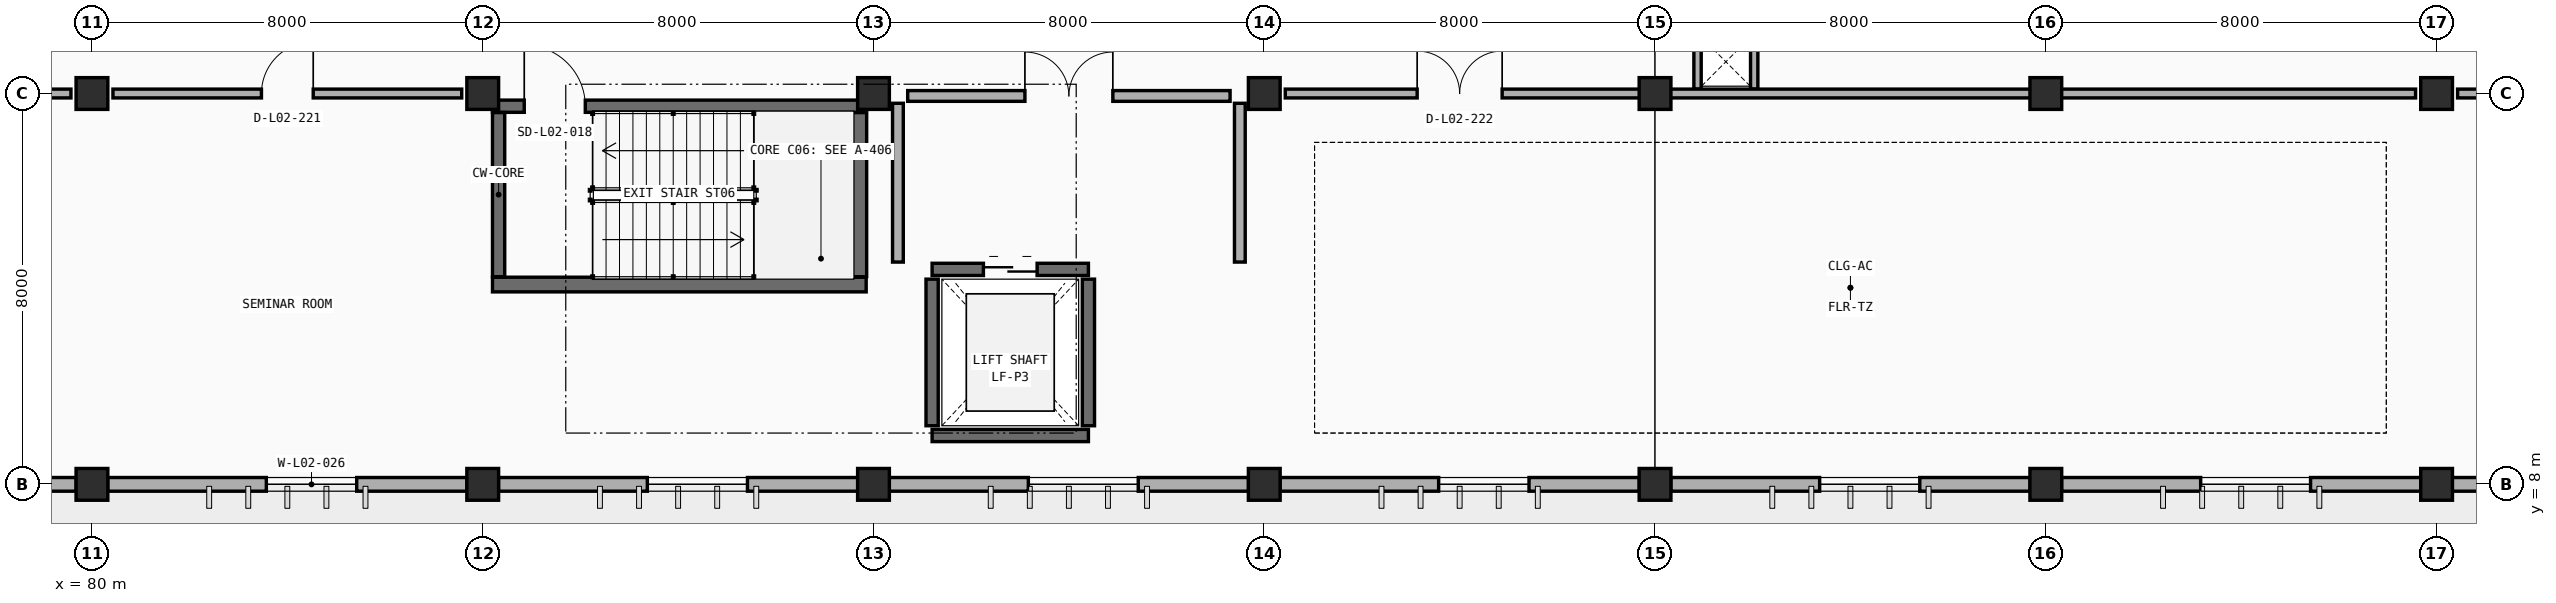
"""IFC4 building model, lengths in metres.
Left out: names, types, materials, properties, quantities, classifications, styles, units other than length and angle.
Written with IfcOpenShell. Run it as: python <this file> out.ifc"""

import sys

from ifc_helpers import new_model, si_unit, direction, frame, frame_2d, origin, origin_2d, place, context, subcontext, project, spatial, rectangle, extrude, element, fill, save


model = new_model("IFC4")
c1 = context("Model", 3, precision=1e-05, world=origin(), true_north=direction((0.0, 1.0)))
c2 = subcontext(c1, "Body", "Model", "MODEL_VIEW")
j1 = project(units=[si_unit("LENGTHUNIT", "METRE"), si_unit("PLANEANGLEUNIT", "RADIAN")], contexts=[c1])
p1 = place(None, origin())
s1 = spatial("IfcSite", under=j1, at=p1, CompositionType="ELEMENT")
p2 = place(p1, origin())
s2 = spatial("IfcBuilding", under=s1, at=p2, CompositionType="ELEMENT")
p3 = place(p2, frame((0.0, 0.0, 4.8)))
s3 = spatial("IfcBuildingStorey", under=s2, at=p3, CompositionType="ELEMENT", Elevation=4.8)
for number, where, z_axis, x_axis in (
    (1, (80.0, 8.0, 0.0), (0.0, 0.0, 1.0), (1.0, 0.0, 0.0)),
    (2, (88.0, 8.0, 0.0), (0.0, 0.0, 1.0), (1.0, 0.0, 0.0)),
    (3, (96.0, 8.0, 0.0), (0.0, 0.0, 1.0), (1.0, 0.0, 0.0)),
    (4, (104.0, 8.0, 0.0), (0.0, 0.0, 1.0), (1.0, 0.0, 0.0)),
    (5, (112.0, 8.0, 0.0), (0.0, 0.0, 1.0), (1.0, 0.0, 0.0)),
    (6, (120.0, 8.0, 0.0), (0.0, 0.0, 1.0), (1.0, 0.0, 0.0)),
    (7, (128.0, 8.0, 0.0), (0.0, 0.0, 1.0), (1.0, 0.0, 0.0)),
    (8, (80.0, 16.0, 0.0), (0.0, 0.0, 1.0), (1.0, 0.0, 0.0)),
    (9, (88.0, 16.0, 0.0), (0.0, 0.0, 1.0), (1.0, 0.0, 0.0)),
    (10, (96.0, 16.0, 0.0), (0.0, 0.0, 1.0), (1.0, 0.0, 0.0)),
    (11, (104.0, 16.0, 0.0), (0.0, 0.0, 1.0), (1.0, 0.0, 0.0)),
    (12, (112.0, 16.0, 0.0), (0.0, 0.0, 1.0), (1.0, 0.0, 0.0)),
    (13, (120.0, 16.0, 0.0), (0.0, 0.0, 1.0), (1.0, 0.0, 0.0)),
    (14, (128.0, 16.0, 0.0), (0.0, 0.0, 1.0), (1.0, 0.0, 0.0)),
):
    element("IfcColumn", number, at=place(p3, frame(where, z_axis=z_axis, x_axis=x_axis)), inside=s3, PredefinedType="COLUMN", context=c2, shape_type="SweptSolid", body=[
        extrude(rectangle(XDim=0.65, YDim=0.65, at=origin_2d()), origin(), (0.0, 0.0, 1.0), 4.8),
    ])
p4 = place(p3, frame((79.678, 8.0, 0.0), z_axis=(0.0, 0.0, 1.0), x_axis=(-1.0, 0.0, 0.0)))
e15 = element("IfcWall", 15, at=p4, inside=s3, PredefinedType="STANDARD", context=c2, shape_type="SweptSolid", body=[
    extrude(rectangle(XDim=7.356, YDim=0.28, at=frame_2d((3.678, 0.0))), origin(), (0.0, 0.0, 1.0), 3.91),
])
p5 = place(p4, frame((2.858, 0.0, 0.0)))
e16 = element("IfcOpeningElement", 16, at=p5, cuts=e15, PredefinedType="OPENING", context=c2, shape_type="SweptSolid", body=[
    extrude(rectangle(XDim=1.45, YDim=2.25, at=frame_2d((0.725, 1.125))), frame((0.0, 0.15, 0.0), z_axis=(0.0, -1.0, 0.0), x_axis=(1.0, 0.0, 0.0)), (0.0, 0.0, 1.0), 0.3),
])
p6 = place(p3, frame((87.678, 8.0, 0.0), z_axis=(0.0, 0.0, 1.0), x_axis=(-1.0, 0.0, 0.0)))
e17 = element("IfcWall", 17, at=p6, inside=s3, PredefinedType="STANDARD", context=c2, shape_type="SweptSolid", body=[
    extrude(rectangle(XDim=7.356, YDim=0.28, at=frame_2d((3.678, 0.0))), origin(), (0.0, 0.0, 1.0), 3.91),
])
p7 = place(p6, frame((2.258, 0.0, 0.9)))
e18 = element("IfcOpeningElement", 18, at=p7, cuts=e17, PredefinedType="OPENING", context=c2, shape_type="SweptSolid", body=[
    extrude(rectangle(XDim=1.85, YDim=1.25, at=frame_2d((0.925, 0.625))), frame((0.0, 0.15, 0.0), z_axis=(0.0, -1.0, 0.0), x_axis=(1.0, 0.0, 0.0)), (0.0, 0.0, 1.0), 0.3),
])
p8 = place(p3, frame((95.678, 8.0, 0.0), z_axis=(0.0, 0.0, 1.0), x_axis=(-1.0, 0.0, 0.0)))
e19 = element("IfcWall", 19, at=p8, inside=s3, PredefinedType="STANDARD", context=c2, shape_type="SweptSolid", body=[
    extrude(rectangle(XDim=7.356, YDim=0.28, at=frame_2d((3.678, 0.0))), origin(), (0.0, 0.0, 1.0), 3.91),
])
p9 = place(p8, frame((2.258, 0.0, 0.9)))
e20 = element("IfcOpeningElement", 20, at=p9, cuts=e19, PredefinedType="OPENING", context=c2, shape_type="SweptSolid", body=[
    extrude(rectangle(XDim=2.05, YDim=1.25, at=frame_2d((1.025, 0.625))), frame((0.0, 0.15, 0.0), z_axis=(0.0, -1.0, 0.0), x_axis=(1.0, 0.0, 0.0)), (0.0, 0.0, 1.0), 0.3),
])
p10 = place(p3, frame((103.678, 8.0, 0.0), z_axis=(0.0, 0.0, 1.0), x_axis=(-1.0, 0.0, 0.0)))
e21 = element("IfcWall", 21, at=p10, inside=s3, PredefinedType="STANDARD", context=c2, shape_type="SweptSolid", body=[
    extrude(rectangle(XDim=7.356, YDim=0.28, at=frame_2d((3.678, 0.0))), origin(), (0.0, 0.0, 1.0), 3.91),
])
p11 = place(p10, frame((2.258, 0.0, 0.9)))
e22 = element("IfcOpeningElement", 22, at=p11, cuts=e21, PredefinedType="OPENING", context=c2, shape_type="SweptSolid", body=[
    extrude(rectangle(XDim=2.25, YDim=1.25, at=frame_2d((1.125, 0.625))), frame((0.0, 0.15, 0.0), z_axis=(0.0, -1.0, 0.0), x_axis=(1.0, 0.0, 0.0)), (0.0, 0.0, 1.0), 0.3),
])
p12 = place(p3, frame((111.678, 8.0, 0.0), z_axis=(0.0, 0.0, 1.0), x_axis=(-1.0, 0.0, 0.0)))
e23 = element("IfcWall", 23, at=p12, inside=s3, PredefinedType="STANDARD", context=c2, shape_type="SweptSolid", body=[
    extrude(rectangle(XDim=7.356, YDim=0.28, at=frame_2d((3.678, 0.0))), origin(), (0.0, 0.0, 1.0), 3.91),
])
p13 = place(p12, frame((2.258, 0.0, 0.9)))
e24 = element("IfcOpeningElement", 24, at=p13, cuts=e23, PredefinedType="OPENING", context=c2, shape_type="SweptSolid", body=[
    extrude(rectangle(XDim=1.85, YDim=1.25, at=frame_2d((0.925, 0.625))), frame((0.0, 0.15, 0.0), z_axis=(0.0, -1.0, 0.0), x_axis=(1.0, 0.0, 0.0)), (0.0, 0.0, 1.0), 0.3),
])
p14 = place(p3, frame((119.678, 8.0, 0.0), z_axis=(0.0, 0.0, 1.0), x_axis=(-1.0, 0.0, 0.0)))
e25 = element("IfcWall", 25, at=p14, inside=s3, PredefinedType="STANDARD", context=c2, shape_type="SweptSolid", body=[
    extrude(rectangle(XDim=7.356, YDim=0.28, at=frame_2d((3.678, 0.0))), origin(), (0.0, 0.0, 1.0), 3.91),
])
p15 = place(p14, frame((2.258, 0.0, 0.9)))
e26 = element("IfcOpeningElement", 26, at=p15, cuts=e25, PredefinedType="OPENING", context=c2, shape_type="SweptSolid", body=[
    extrude(rectangle(XDim=2.05, YDim=1.25, at=frame_2d((1.025, 0.625))), frame((0.0, 0.15, 0.0), z_axis=(0.0, -1.0, 0.0), x_axis=(1.0, 0.0, 0.0)), (0.0, 0.0, 1.0), 0.3),
])
p16 = place(p3, frame((127.678, 8.0, 0.0), z_axis=(0.0, 0.0, 1.0), x_axis=(-1.0, 0.0, 0.0)))
e27 = element("IfcWall", 27, at=p16, inside=s3, PredefinedType="STANDARD", context=c2, shape_type="SweptSolid", body=[
    extrude(rectangle(XDim=7.356, YDim=0.28, at=frame_2d((3.678, 0.0))), origin(), (0.0, 0.0, 1.0), 3.91),
])
p17 = place(p16, frame((2.258, 0.0, 0.9)))
e28 = element("IfcOpeningElement", 28, at=p17, cuts=e27, PredefinedType="OPENING", context=c2, shape_type="SweptSolid", body=[
    extrude(rectangle(XDim=2.25, YDim=1.25, at=frame_2d((1.125, 0.625))), frame((0.0, 0.15, 0.0), z_axis=(0.0, -1.0, 0.0), x_axis=(1.0, 0.0, 0.0)), (0.0, 0.0, 1.0), 0.3),
])
p18 = place(p3, frame((135.678, 8.0, 0.0), z_axis=(0.0, 0.0, 1.0), x_axis=(-1.0, 0.0, 0.0)))
e29 = element("IfcWall", 29, at=p18, inside=s3, PredefinedType="STANDARD", context=c2, shape_type="SweptSolid", body=[
    extrude(rectangle(XDim=7.356, YDim=0.28, at=frame_2d((3.678, 0.0))), origin(), (0.0, 0.0, 1.0), 3.91),
])
p19 = place(p18, frame((2.258, 0.0, 0.9)))
e30 = element("IfcOpeningElement", 30, at=p19, cuts=e29, PredefinedType="OPENING", context=c2, shape_type="SweptSolid", body=[
    extrude(rectangle(XDim=1.85, YDim=1.25, at=frame_2d((0.925, 0.625))), frame((0.0, 0.15, 0.0), z_axis=(0.0, -1.0, 0.0), x_axis=(1.0, 0.0, 0.0)), (0.0, 0.0, 1.0), 0.3),
])
p20 = place(p3, frame((88.2, 12.09, 0.0), z_axis=(0.0, 0.0, 1.0), x_axis=(1.0, 0.0, 0.0)))
e31 = element("IfcWall", 31, at=p20, inside=s3, PredefinedType="SHEAR", context=c2, shape_type="SweptSolid", body=[
    extrude(rectangle(XDim=7.65, YDim=0.3, at=frame_2d((3.825, 0.0))), origin(), (0.0, 0.0, 1.0), 4.8),
])
p21 = place(p3, frame((95.71, 12.25, 0.0), z_axis=(0.0, 0.0, 1.0), x_axis=(0.0, 1.0, 0.0)))
e32 = element("IfcWall", 32, at=p21, inside=s3, PredefinedType="SHEAR", context=c2, shape_type="SweptSolid", body=[
    extrude(rectangle(XDim=3.36, YDim=0.3, at=frame_2d((1.68, 0.0))), origin(), (0.0, 0.0, 1.0), 4.8),
])
p22 = place(p3, frame((88.2, 15.74, 0.0), z_axis=(0.0, 0.0, 1.0), x_axis=(1.0, 0.0, 0.0)))
e33 = element("IfcWall", 33, at=p22, inside=s3, PredefinedType="SOLIDWALL", context=c2, shape_type="SweptSolid", body=[
    extrude(rectangle(XDim=7.65, YDim=0.25, at=frame_2d((3.825, 0.0))), origin(), (0.0, 0.0, 1.0), 4.8),
])
p23 = place(p22, frame((0.65, 0.0, 0.0)))
e34 = element("IfcOpeningElement", 34, at=p23, cuts=e33, PredefinedType="OPENING", context=c2, shape_type="SweptSolid", body=[
    extrude(rectangle(XDim=1.25, YDim=2.15, at=frame_2d((0.625, 1.075))), frame((0.0, 0.135, 0.0), z_axis=(0.0, -1.0, 0.0), x_axis=(1.0, 0.0, 0.0)), (0.0, 0.0, 1.0), 0.27),
])
p24 = place(p3, frame((88.325, 12.25, 0.0), z_axis=(0.0, 0.0, 1.0), x_axis=(0.0, 1.0, 0.0)))
e35 = element("IfcWall", 35, at=p24, inside=s3, PredefinedType="SOLIDWALL", context=c2, shape_type="SweptSolid", body=[
    extrude(rectangle(XDim=3.36, YDim=0.25, at=frame_2d((1.68, 0.0))), origin(), (0.0, 0.0, 1.0), 4.8),
])
p25 = place(p3, frame((97.2, 9.0, 0.0), z_axis=(0.0, 0.0, 1.0), x_axis=(1.0, 0.0, 0.0)))
e36 = element("IfcWall", 36, at=p25, inside=s3, PredefinedType="SOLIDWALL", context=c2, shape_type="SweptSolid", body=[
    extrude(rectangle(XDim=3.2, YDim=0.25, at=frame_2d((1.6, 0.0))), origin(), (0.0, 0.0, 1.0), 4.8),
])
p26 = place(p3, frame((97.2, 12.4, 0.0), z_axis=(0.0, 0.0, 1.0), x_axis=(1.0, 0.0, 0.0)))
e37 = element("IfcWall", 37, at=p26, inside=s3, PredefinedType="SOLIDWALL", context=c2, shape_type="SweptSolid", body=[
    extrude(rectangle(XDim=3.2, YDim=0.25, at=frame_2d((1.6, 0.0))), origin(), (0.0, 0.0, 1.0), 4.8),
])
p27 = place(p26, frame((1.05, 0.0, 0.0)))
e38 = element("IfcOpeningElement", 38, at=p27, cuts=e37, PredefinedType="OPENING", context=c2, shape_type="SweptSolid", body=[
    extrude(rectangle(XDim=1.1, YDim=2.15, at=frame_2d((0.55, 1.075))), frame((0.0, 0.135, 0.0), z_axis=(0.0, -1.0, 0.0), x_axis=(1.0, 0.0, 0.0)), (0.0, 0.0, 1.0), 0.27),
])
for number, where, z_axis, x_axis in (
    (39, (97.2, 9.2, 0.0), (0.0, 0.0, 1.0), (0.0, 1.0, 0.0)),
    (40, (100.4, 9.2, 0.0), (0.0, 0.0, 1.0), (0.0, 1.0, 0.0)),
):
    element("IfcWall", number, at=place(p3, frame(where, z_axis=z_axis, x_axis=x_axis)), inside=s3, PredefinedType="SOLIDWALL", context=c2, shape_type="SweptSolid", body=[
        extrude(rectangle(XDim=3.0, YDim=0.25, at=frame_2d((1.5, 0.0))), origin(), (0.0, 0.0, 1.0), 4.8),
    ])
p28 = place(p3, frame((96.7, 15.95, 0.0), z_axis=(0.0, 0.0, 1.0), x_axis=(1.0, 0.0, 0.0)))
e41 = element("IfcWall", 41, at=p28, inside=s3, PredefinedType="PARTITIONING", context=c2, shape_type="SweptSolid", body=[
    extrude(rectangle(XDim=6.6, YDim=0.22, at=frame_2d((3.3, 0.0))), origin(), (0.0, 0.0, 1.0), 3.86),
])
p29 = place(p28, frame((2.4, 0.0, 0.0)))
e42 = element("IfcOpeningElement", 42, at=p29, cuts=e41, PredefinedType="OPENING", context=c2, shape_type="SweptSolid", body=[
    extrude(rectangle(XDim=1.8, YDim=2.2, at=frame_2d((0.9, 1.1))), frame((0.0, 0.12, 0.0), z_axis=(0.0, -1.0, 0.0), x_axis=(1.0, 0.0, 0.0)), (0.0, 0.0, 1.0), 0.24),
])
for number, where, z_axis, x_axis in (
    (43, (96.5, 12.55, 0.0), (0.0, 0.0, 1.0), (0.0, 1.0, 0.0)),
    (44, (103.5, 12.55, 0.0), (0.0, 0.0, 1.0), (0.0, 1.0, 0.0)),
):
    element("IfcWall", number, at=place(p3, frame(where, z_axis=z_axis, x_axis=x_axis)), inside=s3, PredefinedType="PARTITIONING", context=c2, shape_type="SweptSolid", body=[
        extrude(rectangle(XDim=3.25, YDim=0.22, at=frame_2d((1.625, 0.0))), origin(), (0.0, 0.0, 1.0), 3.76),
    ])
for number, where, z_axis, x_axis in (
    (45, (114.03, 16.09, 0.0), (0.0, 0.0, 1.0), (0.0, 1.0, 0.0)),
    (46, (112.87, 17.23, 0.0), (0.0, 0.0, 1.0), (0.0, -1.0, 0.0)),
):
    element("IfcWall", number, at=place(p3, frame(where, z_axis=z_axis, x_axis=x_axis)), inside=s3, PredefinedType="PARTITIONING", context=c2, shape_type="SweptSolid", body=[
        extrude(rectangle(XDim=1.14, YDim=0.15, at=frame_2d((0.57, 0.0))), origin(), (0.0, 0.0, 1.0), 4.5),
    ])
p30 = place(p3, frame((56.43, 16.0, 0.0), z_axis=(0.0, 0.0, 1.0), x_axis=(1.0, 0.0, 0.0)))
e47 = element("IfcWall", 47, at=p30, inside=s3, PredefinedType="PARTITIONING", context=c2, shape_type="SweptSolid", body=[
    extrude(rectangle(XDim=23.14, YDim=0.18, at=frame_2d((11.57, 0.0))), origin(), (0.0, 0.0, 1.0), 3.86),
])
p31 = place(p30, frame((3.06, 0.0, 0.0)))
e48 = element("IfcOpeningElement", 48, at=p31, cuts=e47, PredefinedType="OPENING", context=c2, shape_type="SweptSolid", body=[
    extrude(rectangle(XDim=1.02, YDim=2.1, at=frame_2d((0.51, 1.05))), frame((0.0, 0.1, 0.0), z_axis=(0.0, -1.0, 0.0), x_axis=(1.0, 0.0, 0.0)), (0.0, 0.0, 1.0), 0.2),
])
p32 = place(p3, frame((80.43, 16.0, 0.0), z_axis=(0.0, 0.0, 1.0), x_axis=(1.0, 0.0, 0.0)))
e49 = element("IfcWall", 49, at=p32, inside=s3, PredefinedType="PARTITIONING", context=c2, shape_type="SweptSolid", body=[
    extrude(rectangle(XDim=7.14, YDim=0.18, at=frame_2d((3.57, 0.0))), origin(), (0.0, 0.0, 1.0), 3.86),
])
p33 = place(p32, frame((3.04, 0.0, 0.0)))
e50 = element("IfcOpeningElement", 50, at=p33, cuts=e49, PredefinedType="OPENING", context=c2, shape_type="SweptSolid", body=[
    extrude(rectangle(XDim=1.06, YDim=2.1, at=frame_2d((0.53, 1.05))), frame((0.0, 0.1, 0.0), z_axis=(0.0, -1.0, 0.0), x_axis=(1.0, 0.0, 0.0)), (0.0, 0.0, 1.0), 0.2),
])
p34 = place(p3, frame((104.43, 16.0, 0.0), z_axis=(0.0, 0.0, 1.0), x_axis=(1.0, 0.0, 0.0)))
e51 = element("IfcWall", 51, at=p34, inside=s3, PredefinedType="PARTITIONING", context=c2, shape_type="SweptSolid", body=[
    extrude(rectangle(XDim=23.14, YDim=0.18, at=frame_2d((11.57, 0.0))), origin(), (0.0, 0.0, 1.0), 3.86),
])
p35 = place(p34, frame((2.7, 0.0, 0.0)))
e52 = element("IfcOpeningElement", 52, at=p35, cuts=e51, PredefinedType="OPENING", context=c2, shape_type="SweptSolid", body=[
    extrude(rectangle(XDim=1.74, YDim=2.22, at=frame_2d((0.87, 1.11))), frame((0.0, 0.1, 0.0), z_axis=(0.0, -1.0, 0.0), x_axis=(1.0, 0.0, 0.0)), (0.0, 0.0, 1.0), 0.2),
])
p36 = place(p3, frame((128.43, 16.0, 0.0), z_axis=(0.0, 0.0, 1.0), x_axis=(1.0, 0.0, 0.0)))
e53 = element("IfcWall", 53, at=p36, inside=s3, PredefinedType="PARTITIONING", context=c2, shape_type="SweptSolid", body=[
    extrude(rectangle(XDim=15.14, YDim=0.18, at=frame_2d((7.57, 0.0))), origin(), (0.0, 0.0, 1.0), 3.86),
])
p37 = place(p36, frame((2.66, 0.0, 0.0)))
e54 = element("IfcOpeningElement", 54, at=p37, cuts=e53, PredefinedType="OPENING", context=c2, shape_type="SweptSolid", body=[
    extrude(rectangle(XDim=1.82, YDim=2.25, at=frame_2d((0.91, 1.125))), frame((0.0, 0.1, 0.0), z_axis=(0.0, -1.0, 0.0), x_axis=(1.0, 0.0, 0.0)), (0.0, 0.0, 1.0), 0.2),
])
p38 = place(p7, origin())
e55 = element("IfcWindow", 55, at=p38, inside=s3, PartitioningType="DOUBLE_PANEL_VERTICAL", PredefinedType="WINDOW", context=c2, shape_type="SweptSolid", body=[
    extrude(rectangle(XDim=1.85, YDim=1.25, at=frame_2d((0.925, 0.625))), frame((0.0, 0.03, 0.0), z_axis=(0.0, -1.0, 0.0), x_axis=(1.0, 0.0, 0.0)), (0.0, 0.0, 1.0), 0.06),
])
fill(e18, e55)
p39 = place(p9, origin())
e56 = element("IfcWindow", 56, at=p39, inside=s3, PartitioningType="DOUBLE_PANEL_VERTICAL", PredefinedType="WINDOW", context=c2, shape_type="SweptSolid", body=[
    extrude(rectangle(XDim=2.05, YDim=1.25, at=frame_2d((1.025, 0.625))), frame((0.0, 0.03, 0.0), z_axis=(0.0, -1.0, 0.0), x_axis=(1.0, 0.0, 0.0)), (0.0, 0.0, 1.0), 0.06),
])
fill(e20, e56)
p40 = place(p11, origin())
e57 = element("IfcWindow", 57, at=p40, inside=s3, PartitioningType="DOUBLE_PANEL_VERTICAL", PredefinedType="WINDOW", context=c2, shape_type="SweptSolid", body=[
    extrude(rectangle(XDim=2.25, YDim=1.25, at=frame_2d((1.125, 0.625))), frame((0.0, 0.03, 0.0), z_axis=(0.0, -1.0, 0.0), x_axis=(1.0, 0.0, 0.0)), (0.0, 0.0, 1.0), 0.06),
])
fill(e22, e57)
p41 = place(p13, origin())
e58 = element("IfcWindow", 58, at=p41, inside=s3, PartitioningType="DOUBLE_PANEL_VERTICAL", PredefinedType="WINDOW", context=c2, shape_type="SweptSolid", body=[
    extrude(rectangle(XDim=1.85, YDim=1.25, at=frame_2d((0.925, 0.625))), frame((0.0, 0.03, 0.0), z_axis=(0.0, -1.0, 0.0), x_axis=(1.0, 0.0, 0.0)), (0.0, 0.0, 1.0), 0.06),
])
fill(e24, e58)
p42 = place(p15, origin())
e59 = element("IfcWindow", 59, at=p42, inside=s3, PartitioningType="DOUBLE_PANEL_VERTICAL", PredefinedType="WINDOW", context=c2, shape_type="SweptSolid", body=[
    extrude(rectangle(XDim=2.05, YDim=1.25, at=frame_2d((1.025, 0.625))), frame((0.0, 0.03, 0.0), z_axis=(0.0, -1.0, 0.0), x_axis=(1.0, 0.0, 0.0)), (0.0, 0.0, 1.0), 0.06),
])
fill(e26, e59)
p43 = place(p17, origin())
e60 = element("IfcWindow", 60, at=p43, inside=s3, PartitioningType="DOUBLE_PANEL_VERTICAL", PredefinedType="WINDOW", context=c2, shape_type="SweptSolid", body=[
    extrude(rectangle(XDim=2.25, YDim=1.25, at=frame_2d((1.125, 0.625))), frame((0.0, 0.03, 0.0), z_axis=(0.0, -1.0, 0.0), x_axis=(1.0, 0.0, 0.0)), (0.0, 0.0, 1.0), 0.06),
])
fill(e28, e60)
p44 = place(p23, origin())
e61 = element("IfcDoor", 61, at=p44, inside=s3, OperationType="SINGLE_SWING_LEFT", PredefinedType="DOOR", context=c2, shape_type="SweptSolid", body=[
    extrude(rectangle(XDim=1.25, YDim=2.15, at=frame_2d((0.625, 1.075))), frame((0.0, 0.025, 0.0), z_axis=(0.0, -1.0, 0.0), x_axis=(1.0, 0.0, 0.0)), (0.0, 0.0, 1.0), 0.05),
])
fill(e34, e61)
p45 = place(p27, origin())
e62 = element("IfcDoor", 62, at=p45, inside=s3, OperationType="DOUBLE_DOOR_SLIDING", PredefinedType="DOOR", context=c2, shape_type="SweptSolid", body=[
    extrude(rectangle(XDim=1.1, YDim=2.15, at=frame_2d((0.55, 1.075))), frame((0.0, 0.025, 0.0), z_axis=(0.0, -1.0, 0.0), x_axis=(1.0, 0.0, 0.0)), (0.0, 0.0, 1.0), 0.05),
])
fill(e38, e62)
p46 = place(p29, origin())
e63 = element("IfcDoor", 63, at=p46, inside=s3, OperationType="DOUBLE_DOOR_SINGLE_SWING", PredefinedType="DOOR", context=c2, shape_type="SweptSolid", body=[
    extrude(rectangle(XDim=1.8, YDim=2.2, at=frame_2d((0.9, 1.1))), frame((0.0, 0.025, 0.0), z_axis=(0.0, -1.0, 0.0), x_axis=(1.0, 0.0, 0.0)), (0.0, 0.0, 1.0), 0.05),
])
fill(e42, e63)
p47 = place(p33, origin())
e64 = element("IfcDoor", 64, at=p47, inside=s3, OperationType="SINGLE_SWING_RIGHT", PredefinedType="DOOR", context=c2, shape_type="SweptSolid", body=[
    extrude(rectangle(XDim=1.06, YDim=2.1, at=frame_2d((0.53, 1.05))), frame((0.0, 0.025, 0.0), z_axis=(0.0, -1.0, 0.0), x_axis=(1.0, 0.0, 0.0)), (0.0, 0.0, 1.0), 0.05),
])
fill(e50, e64)
p48 = place(p35, origin())
e65 = element("IfcDoor", 65, at=p48, inside=s3, OperationType="DOUBLE_DOOR_SINGLE_SWING", PredefinedType="DOOR", context=c2, shape_type="SweptSolid", body=[
    extrude(rectangle(XDim=1.74, YDim=2.22, at=frame_2d((0.87, 1.11))), frame((0.0, 0.025, 0.0), z_axis=(0.0, -1.0, 0.0), x_axis=(1.0, 0.0, 0.0)), (0.0, 0.0, 1.0), 0.05),
])
fill(e52, e65)
save(model, sys.argv[1])
